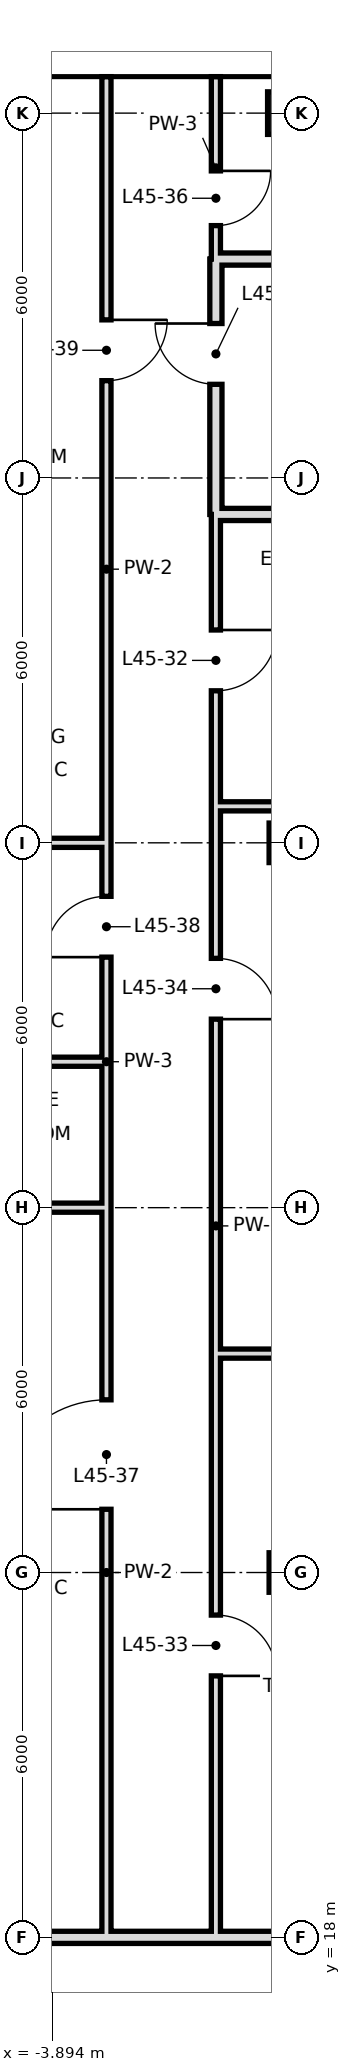
"""IFC4 building model, lengths in metres.
Left out: names, types, materials, properties, quantities, classifications, styles, units other than length and angle.
Written with IfcOpenShell. Run it as: python <this file> out.ifc"""

import sys

from ifc_helpers import new_model, si_unit, direction, frame, frame_2d, origin, origin_2d, place, context, subcontext, project, spatial, rectangle, hollow_rectangle, extrude, element, fill, save


model = new_model("IFC4")
c1 = context("Model", 3, precision=1e-05, world=origin(), true_north=direction((0.0, 1.0)))
c2 = subcontext(c1, "Body", "Model", "MODEL_VIEW")
j1 = project(units=[si_unit("LENGTHUNIT", "METRE"), si_unit("PLANEANGLEUNIT", "RADIAN")], contexts=[c1])
p1 = place(None, origin())
s1 = spatial("IfcSite", under=j1, at=p1, CompositionType="ELEMENT")
p2 = place(p1, origin())
s2 = spatial("IfcBuilding", under=s1, at=p2, CompositionType="ELEMENT")
p3 = place(p2, frame((0.0, 0.0, 195.6)))
s3 = spatial("IfcBuildingStorey", under=s2, at=p3, CompositionType="ELEMENT", Elevation=195.6)
for number, where, z_axis, x_axis in (
    (1, (0.0, 24.0, 0.0), (0.0, 0.0, 1.0), (1.0, 0.0, 0.0)),
    (2, (0.0, 36.0, 0.0), (0.0, 0.0, 1.0), (1.0, 0.0, 0.0)),
):
    element("IfcColumn", number, at=place(p3, frame(where, z_axis=z_axis, x_axis=x_axis)), inside=s3, PredefinedType="COLUMN", context=c2, shape_type="SweptSolid", body=[
        extrude(hollow_rectangle(XDim=0.65, YDim=0.65, WallThickness=0.032, at=origin_2d()), origin(), (0.0, 0.0, 1.0), 3.6),
    ])
p4 = place(p3, frame((0.0, 48.0, 0.0), z_axis=(0.0, 0.0, 1.0), x_axis=(1.0, 0.0, 0.0)))
e3 = element("IfcColumn", 3, at=p4, inside=s3, PredefinedType="COLUMN", context=c2, shape_type="SweptSolid", body=[
    extrude(hollow_rectangle(XDim=0.7, YDim=0.7, WallThickness=0.036, at=origin_2d()), origin(), (0.0, 0.0, 1.0), 3.6),
])
p5 = place(p3, frame((-1.2, 41.4, 0.0), z_axis=(0.0, 0.0, 1.0), x_axis=(0.0, 1.0, 0.0)))
e4 = element("IfcWall", 4, at=p5, inside=s3, PredefinedType="SOLIDWALL", context=c2, shape_type="SweptSolid", body=[
    extrude(rectangle(XDim=4.2, YDim=0.2, at=frame_2d((2.1, 0.0))), origin(), (0.0, 0.0, 1.0), 2.72),
])
p6 = place(p5, frame((2.14, 0.0, 0.0)))
e5 = element("IfcOpeningElement", 5, at=p6, cuts=e4, PredefinedType="OPENING", context=c2, shape_type="SweptSolid", body=[
    extrude(rectangle(XDim=1.0, YDim=2.4, at=frame_2d((0.5, 1.2))), frame((0.0, 0.11, 0.0), z_axis=(0.0, -1.0, 0.0), x_axis=(1.0, 0.0, 0.0)), (0.0, 0.0, 1.0), 0.22),
])
p7 = place(p3, frame((-1.2, 18.0, 0.0), z_axis=(0.0, 0.0, 1.0), x_axis=(0.0, 1.0, 0.0)))
e6 = element("IfcWall", 6, at=p7, inside=s3, PredefinedType="PARTITIONING", context=c2, shape_type="SweptSolid", body=[
    extrude(rectangle(XDim=23.4, YDim=0.15, at=frame_2d((11.7, 0.0))), origin(), (0.0, 0.0, 1.0), 3.42),
])
p8 = place(p7, frame((20.5, 0.0, 0.0)))
e7 = element("IfcOpeningElement", 7, at=p8, cuts=e6, PredefinedType="OPENING", context=c2, shape_type="SweptSolid", body=[
    extrude(rectangle(XDim=1.0, YDim=2.4, at=frame_2d((0.5, 1.2))), frame((0.0, 0.085, 0.0), z_axis=(0.0, -1.0, 0.0), x_axis=(1.0, 0.0, 0.0)), (0.0, 0.0, 1.0), 0.17),
])
p9 = place(p7, frame((4.3, 0.0, 0.0)))
e8 = element("IfcOpeningElement", 8, at=p9, cuts=e6, PredefinedType="OPENING", context=c2, shape_type="SweptSolid", body=[
    extrude(rectangle(XDim=1.0, YDim=2.4, at=frame_2d((0.5, 1.2))), frame((0.0, 0.085, 0.0), z_axis=(0.0, -1.0, 0.0), x_axis=(1.0, 0.0, 0.0)), (0.0, 0.0, 1.0), 0.17),
])
p10 = place(p7, frame((15.1, 0.0, 0.0)))
e9 = element("IfcOpeningElement", 9, at=p10, cuts=e6, PredefinedType="OPENING", context=c2, shape_type="SweptSolid", body=[
    extrude(rectangle(XDim=1.0, YDim=2.4, at=frame_2d((0.5, 1.2))), frame((0.0, 0.085, 0.0), z_axis=(0.0, -1.0, 0.0), x_axis=(1.0, 0.0, 0.0)), (0.0, 0.0, 1.0), 0.17),
])
p11 = place(p3, frame((-1.2, 45.6, 0.0), z_axis=(0.0, 0.0, 1.0), x_axis=(0.0, 1.0, 0.0)))
e10 = element("IfcWall", 10, at=p11, inside=s3, PredefinedType="PARTITIONING", context=c2, shape_type="SweptSolid", body=[
    extrude(rectangle(XDim=3.0, YDim=0.15, at=frame_2d((1.5, 0.0))), origin(), (0.0, 0.0, 1.0), 3.42),
])
p12 = place(p11, frame((0.55, 0.0, 0.0)))
e11 = element("IfcOpeningElement", 11, at=p12, cuts=e10, PredefinedType="OPENING", context=c2, shape_type="SweptSolid", body=[
    extrude(rectangle(XDim=0.9, YDim=2.4, at=frame_2d((0.45, 1.2))), frame((0.0, 0.085, 0.0), z_axis=(0.0, -1.0, 0.0), x_axis=(1.0, 0.0, 0.0)), (0.0, 0.0, 1.0), 0.17),
])
p13 = place(p3, frame((-3.0, 18.0, 0.0), z_axis=(0.0, 0.0, 1.0), x_axis=(0.0, 1.0, 0.0)))
e12 = element("IfcWall", 12, at=p13, inside=s3, PredefinedType="PARTITIONING", context=c2, shape_type="SweptSolid", body=[
    extrude(rectangle(XDim=12.0, YDim=0.15, at=frame_2d((6.0, 0.0))), origin(), (0.0, 0.0, 1.0), 3.42),
])
p14 = place(p13, frame((7.04, 0.0, 0.0)))
e13 = element("IfcOpeningElement", 13, at=p14, cuts=e12, PredefinedType="OPENING", context=c2, shape_type="SweptSolid", body=[
    extrude(rectangle(XDim=1.8, YDim=2.4, at=frame_2d((0.9, 1.2))), frame((0.0, 0.085, 0.0), z_axis=(0.0, -1.0, 0.0), x_axis=(1.0, 0.0, 0.0)), (0.0, 0.0, 1.0), 0.17),
])
p15 = place(p3, frame((-3.0, 32.4, 0.0), z_axis=(0.0, 0.0, 1.0), x_axis=(0.0, 1.0, 0.0)))
e14 = element("IfcWall", 14, at=p15, inside=s3, PredefinedType="PARTITIONING", context=c2, shape_type="SweptSolid", body=[
    extrude(rectangle(XDim=16.2, YDim=0.15, at=frame_2d((8.1, 0.0))), origin(), (0.0, 0.0, 1.0), 3.42),
])
p16 = place(p15, frame((1.72, 0.0, 0.0)))
e15 = element("IfcOpeningElement", 15, at=p16, cuts=e14, PredefinedType="OPENING", context=c2, shape_type="SweptSolid", body=[
    extrude(rectangle(XDim=1.0, YDim=2.4, at=frame_2d((0.5, 1.2))), frame((0.0, 0.085, 0.0), z_axis=(0.0, -1.0, 0.0), x_axis=(1.0, 0.0, 0.0)), (0.0, 0.0, 1.0), 0.17),
])
p17 = place(p15, frame((11.2, 0.0, 0.0)))
e16 = element("IfcOpeningElement", 16, at=p17, cuts=e14, PredefinedType="OPENING", context=c2, shape_type="SweptSolid", body=[
    extrude(rectangle(XDim=1.0, YDim=2.4, at=frame_2d((0.5, 1.2))), frame((0.0, 0.085, 0.0), z_axis=(0.0, -1.0, 0.0), x_axis=(1.0, 0.0, 0.0)), (0.0, 0.0, 1.0), 0.17),
])
p18 = place(p3, frame((-3.0, 30.0, 0.0), z_axis=(0.0, 0.0, 1.0), x_axis=(0.0, 1.0, 0.0)))
e17 = element("IfcWall", 17, at=p18, inside=s3, PredefinedType="PARTITIONING", context=c2, shape_type="SweptSolid", body=[
    extrude(rectangle(XDim=2.4, YDim=0.15, at=frame_2d((1.2, 0.0))), origin(), (0.0, 0.0, 1.0), 3.42),
])
p19 = place(p3, frame((-12.6, 18.0, 0.0), z_axis=(0.0, 0.0, 1.0), x_axis=(1.0, 0.0, 0.0)))
e18 = element("IfcWall", 18, at=p19, inside=s3, PredefinedType="SOLIDWALL", context=c2, shape_type="SweptSolid", body=[
    extrude(rectangle(XDim=15.0, YDim=0.2, at=frame_2d((7.5, 0.0))), origin(), (0.0, 0.0, 1.0), 2.72),
])
p20 = place(p3, frame((-1.2, 27.6, 0.0), z_axis=(0.0, 0.0, 1.0), x_axis=(1.0, 0.0, 0.0)))
e19 = element("IfcWall", 19, at=p20, inside=s3, PredefinedType="PARTITIONING", context=c2, shape_type="SweptSolid", body=[
    extrude(rectangle(XDim=4.3, YDim=0.15, at=frame_2d((2.15, 0.0))), origin(), (0.0, 0.0, 1.0), 3.42),
])
p21 = place(p3, frame((-6.0, 30.0, 0.0), z_axis=(0.0, 0.0, 1.0), x_axis=(1.0, 0.0, 0.0)))
e20 = element("IfcWall", 20, at=p21, inside=s3, PredefinedType="PARTITIONING", context=c2, shape_type="SweptSolid", body=[
    extrude(rectangle(XDim=3.0, YDim=0.15, at=frame_2d((1.5, 0.0))), origin(), (0.0, 0.0, 1.0), 2.72),
])
p22 = place(p3, frame((-6.0, 32.4, 0.0), z_axis=(0.0, 0.0, 1.0), x_axis=(1.0, 0.0, 0.0)))
e21 = element("IfcWall", 21, at=p22, inside=s3, PredefinedType="PARTITIONING", context=c2, shape_type="SweptSolid", body=[
    extrude(rectangle(XDim=3.0, YDim=0.15, at=frame_2d((1.5, 0.0))), origin(), (0.0, 0.0, 1.0), 3.42),
])
p23 = place(p3, frame((-12.0, 36.0, 0.0), z_axis=(0.0, 0.0, 1.0), x_axis=(1.0, 0.0, 0.0)))
e22 = element("IfcWall", 22, at=p23, inside=s3, PredefinedType="PARTITIONING", context=c2, shape_type="SweptSolid", body=[
    extrude(rectangle(XDim=9.0, YDim=0.15, at=frame_2d((4.5, 0.0))), origin(), (0.0, 0.0, 1.0), 2.72),
])
p24 = place(p3, frame((-1.2, 36.6, 0.0), z_axis=(0.0, 0.0, 1.0), x_axis=(1.0, 0.0, 0.0)))
e23 = element("IfcWall", 23, at=p24, inside=s3, PredefinedType="PARTITIONING", context=c2, shape_type="SweptSolid", body=[
    extrude(rectangle(XDim=4.3, YDim=0.15, at=frame_2d((2.15, 0.0))), origin(), (0.0, 0.0, 1.0), 3.42),
])
for number, where, z_axis, x_axis in (
    (24, (-1.2, 41.4, 0.0), (0.0, 0.0, 1.0), (1.0, 0.0, 0.0)),
    (25, (-1.2, 45.6, 0.0), (0.0, 0.0, 1.0), (1.0, 0.0, 0.0)),
):
    element("IfcWall", number, at=place(p3, frame(where, z_axis=z_axis, x_axis=x_axis)), inside=s3, PredefinedType="SOLIDWALL", context=c2, shape_type="SweptSolid", body=[
        extrude(rectangle(XDim=4.3, YDim=0.2, at=frame_2d((2.15, 0.0))), origin(), (0.0, 0.0, 1.0), 2.72),
    ])
p25 = place(p8, origin())
e26 = element("IfcDoor", 26, at=p25, inside=s3, OperationType="SINGLE_SWING_RIGHT", PredefinedType="DOOR", context=c2, shape_type="SweptSolid", body=[
    extrude(rectangle(XDim=1.0, YDim=2.4, at=frame_2d((0.5, 1.2))), frame((0.0, 0.025, 0.0), z_axis=(0.0, -1.0, 0.0), x_axis=(1.0, 0.0, 0.0)), (0.0, 0.0, 1.0), 0.05),
])
fill(e7, e26)
p26 = place(p9, frame((1.0, 0.0, 0.0), z_axis=(0.0, 0.0, 1.0), x_axis=(-1.0, 0.0, 0.0)))
e27 = element("IfcDoor", 27, at=p26, inside=s3, OperationType="SINGLE_SWING_RIGHT", PredefinedType="DOOR", context=c2, shape_type="SweptSolid", body=[
    extrude(rectangle(XDim=1.0, YDim=2.4, at=frame_2d((0.5, 1.2))), frame((0.0, 0.025, 0.0), z_axis=(0.0, -1.0, 0.0), x_axis=(1.0, 0.0, 0.0)), (0.0, 0.0, 1.0), 0.05),
])
fill(e8, e27)
p27 = place(p10, frame((1.0, 0.0, 0.0), z_axis=(0.0, 0.0, 1.0), x_axis=(-1.0, 0.0, 0.0)))
e28 = element("IfcDoor", 28, at=p27, inside=s3, OperationType="SINGLE_SWING_RIGHT", PredefinedType="DOOR", context=c2, shape_type="SweptSolid", body=[
    extrude(rectangle(XDim=1.0, YDim=2.4, at=frame_2d((0.5, 1.2))), frame((0.0, 0.025, 0.0), z_axis=(0.0, -1.0, 0.0), x_axis=(1.0, 0.0, 0.0)), (0.0, 0.0, 1.0), 0.05),
])
fill(e9, e28)
p28 = place(p6, frame((1.0, 0.0, 0.0), z_axis=(0.0, 0.0, 1.0), x_axis=(-1.0, 0.0, 0.0)))
e29 = element("IfcDoor", 29, at=p28, inside=s3, OperationType="SINGLE_SWING_LEFT", PredefinedType="DOOR", context=c2, shape_type="SweptSolid", body=[
    extrude(rectangle(XDim=1.0, YDim=2.4, at=frame_2d((0.5, 1.2))), frame((0.0, 0.025, 0.0), z_axis=(0.0, -1.0, 0.0), x_axis=(1.0, 0.0, 0.0)), (0.0, 0.0, 1.0), 0.05),
])
fill(e5, e29)
p29 = place(p12, origin())
e30 = element("IfcDoor", 30, at=p29, inside=s3, OperationType="SINGLE_SWING_RIGHT", PredefinedType="DOOR", context=c2, shape_type="SweptSolid", body=[
    extrude(rectangle(XDim=0.9, YDim=2.4, at=frame_2d((0.45, 1.2))), frame((0.0, 0.025, 0.0), z_axis=(0.0, -1.0, 0.0), x_axis=(1.0, 0.0, 0.0)), (0.0, 0.0, 1.0), 0.05),
])
fill(e11, e30)
p30 = place(p14, origin())
e31 = element("IfcDoor", 31, at=p30, inside=s3, OperationType="SINGLE_SWING_LEFT", PredefinedType="DOOR", context=c2, shape_type="SweptSolid", body=[
    extrude(rectangle(XDim=1.8, YDim=2.4, at=frame_2d((0.9, 1.2))), frame((0.0, 0.025, 0.0), z_axis=(0.0, -1.0, 0.0), x_axis=(1.0, 0.0, 0.0)), (0.0, 0.0, 1.0), 0.05),
])
fill(e13, e31)
p31 = place(p16, origin())
e32 = element("IfcDoor", 32, at=p31, inside=s3, OperationType="SINGLE_SWING_LEFT", PredefinedType="DOOR", context=c2, shape_type="SweptSolid", body=[
    extrude(rectangle(XDim=1.0, YDim=2.4, at=frame_2d((0.5, 1.2))), frame((0.0, 0.025, 0.0), z_axis=(0.0, -1.0, 0.0), x_axis=(1.0, 0.0, 0.0)), (0.0, 0.0, 1.0), 0.05),
])
fill(e15, e32)
p32 = place(p17, origin())
e33 = element("IfcDoor", 33, at=p32, inside=s3, OperationType="SINGLE_SWING_RIGHT", PredefinedType="DOOR", context=c2, shape_type="SweptSolid", body=[
    extrude(rectangle(XDim=1.0, YDim=2.4, at=frame_2d((0.5, 1.2))), frame((0.0, 0.025, 0.0), z_axis=(0.0, -1.0, 0.0), x_axis=(1.0, 0.0, 0.0)), (0.0, 0.0, 1.0), 0.05),
])
fill(e16, e33)
save(model, sys.argv[1])
